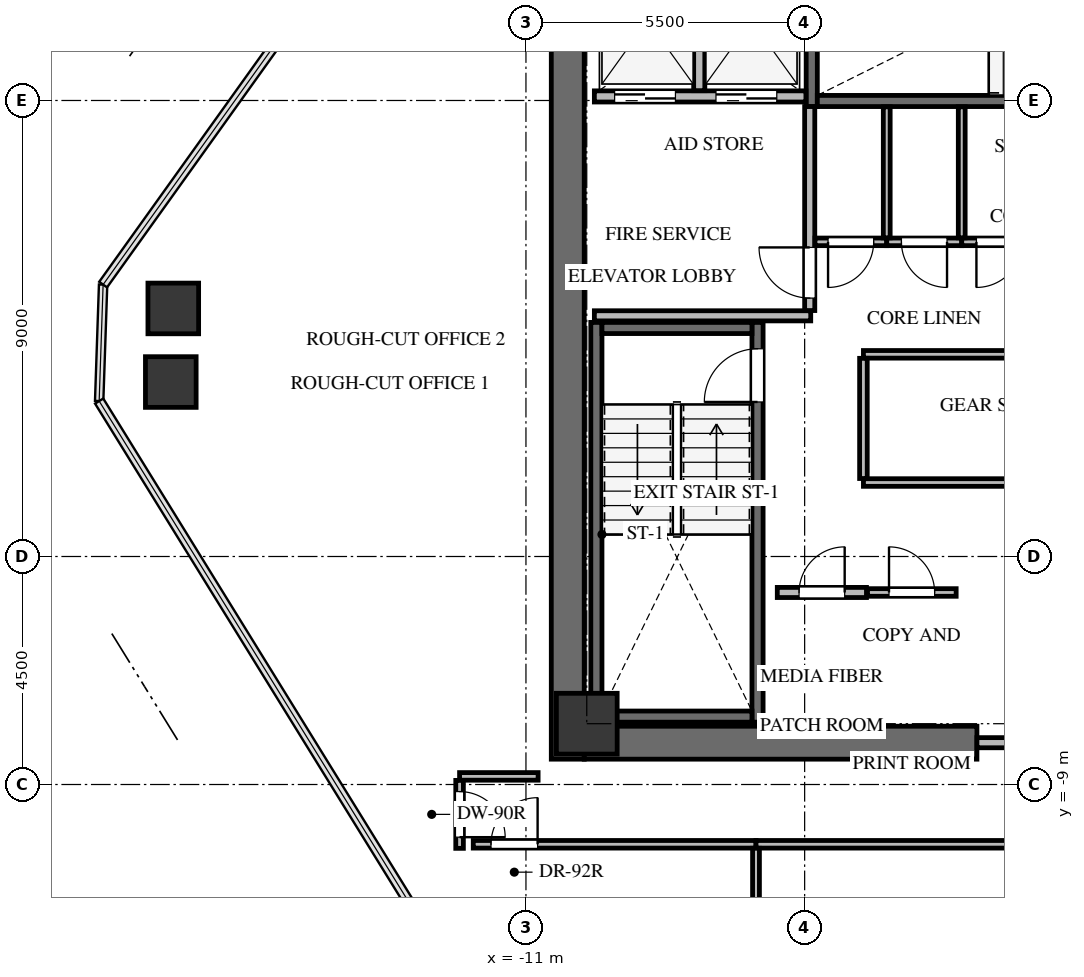
"""IFC4 building model, lengths in metres.
Left out: names, types, materials, properties, quantities, classifications, styles, units other than length and angle.
Written with IfcOpenShell. Run it as: python <this file> out.ifc"""

import sys

from ifc_helpers import new_model, si_unit, direction, frame, frame_2d, origin, origin_2d, place, context, subcontext, project, spatial, rectangle, extrude, source, transform, mapped, element, fill, save


model = new_model("IFC4")
c1 = context("Model", 3, precision=1e-05, world=origin(), true_north=direction((0.0, 1.0)))
c2 = subcontext(c1, "Body", "Model", "MODEL_VIEW")
j1 = project(units=[si_unit("LENGTHUNIT", "METRE"), si_unit("PLANEANGLEUNIT", "RADIAN")], contexts=[c1])
p1 = place(None, origin())
s1 = spatial("IfcSite", under=j1, at=p1, CompositionType="ELEMENT")
p2 = place(p1, origin())
s2 = spatial("IfcBuilding", under=s1, at=p2, CompositionType="ELEMENT")
p3 = place(p2, frame((0.0, 0.0, 180.4)))
s3 = spatial("IfcBuildingStorey", under=s2, at=p3, CompositionType="ELEMENT", Elevation=180.4)
p4 = place(p3, frame((-10.175, -8.5, 0.0), z_axis=(0.0, 0.0, 1.0), x_axis=(0.0, 1.0, 0.0)))
e1 = element("IfcWall", 1, at=p4, inside=s3, PredefinedType="SHEAR", context=c2, shape_type="SweptSolid", body=[
    extrude(rectangle(XDim=17.0, YDim=0.65, at=frame_2d((8.5, 0.0))), origin(), (0.0, 0.0, 1.0), 3.3),
])
p5 = place(p3, frame((-9.85, -8.175, 0.0), z_axis=(0.0, 0.0, 1.0), x_axis=(1.0, 0.0, 0.0)))
e2 = element("IfcWall", 2, at=p5, inside=s3, PredefinedType="SHEAR", context=c2, shape_type="SweptSolid", body=[
    extrude(rectangle(XDim=7.75, YDim=0.65, at=frame_2d((3.875, 0.0))), origin(), (0.0, 0.0, 1.0), 3.3),
])
p6 = place(p3, frame((-6.43, -7.77, -0.24), z_axis=(0.0, 0.0, 1.0), x_axis=(0.0, 1.0, 0.0)))
e3 = element("IfcWall", 3, at=p6, inside=s3, PredefinedType="SHEAR", context=c2, shape_type="SweptSolid", body=[
    extrude(rectangle(XDim=7.89, YDim=0.22, at=frame_2d((3.945, 0.0))), origin(), (0.0, 0.0, 1.0), 3.3),
])
p7 = place(p6, frame((6.32, 0.0, 0.0)))
e4 = element("IfcOpeningElement", 4, at=p7, cuts=e3, PredefinedType="OPENING", context=c2, shape_type="SweptSolid", body=[
    extrude(rectangle(XDim=1.05, YDim=2.15, at=frame_2d((0.525, 1.075))), frame((0.0, 0.12, 0.0), z_axis=(0.0, -1.0, 0.0), x_axis=(1.0, 0.0, 0.0)), (0.0, 0.0, 1.0), 0.24),
])
p8 = place(p3, frame((-9.61, 0.12, -0.24), z_axis=(0.0, 0.0, 1.0), x_axis=(0.0, -1.0, 0.0)))
e5 = element("IfcWall", 5, at=p8, inside=s3, PredefinedType="SHEAR", context=c2, shape_type="SweptSolid", body=[
    extrude(rectangle(XDim=7.89, YDim=0.22, at=frame_2d((3.945, 0.0))), origin(), (0.0, 0.0, 1.0), 3.3),
])
for number, where, z_axis, x_axis in (
    (6, (-9.5, -7.66, -0.24), (0.0, 0.0, 1.0), (1.0, 0.0, 0.0)),
    (7, (-6.54, 0.01, -0.24), (0.0, 0.0, 1.0), (-1.0, 0.0, 0.0)),
):
    element("IfcWall", number, at=place(p3, frame(where, z_axis=z_axis, x_axis=x_axis)), inside=s3, PredefinedType="SHEAR", context=c2, shape_type="SweptSolid", body=[
        extrude(rectangle(XDim=2.96, YDim=0.22, at=frame_2d((1.48, 0.0))), origin(), (0.0, 0.0, 1.0), 3.3),
    ])
p9 = place(p3, frame((-5.36, 7.78, -0.24), z_axis=(0.0, 0.0, 1.0), x_axis=(0.0, -1.0, 0.0)))
e8 = element("IfcWall", 8, at=p9, inside=s3, PredefinedType="SHEAR", context=c2, shape_type="SweptSolid", body=[
    extrude(rectangle(XDim=3.4, YDim=0.22, at=frame_2d((1.7, 0.0))), origin(), (0.0, 0.0, 1.0), 3.3),
])
p10 = place(p3, frame((-5.25, 4.49, -0.24), z_axis=(0.0, 0.0, 1.0), x_axis=(1.0, 0.0, 0.0)))
e9 = element("IfcWall", 9, at=p10, inside=s3, PredefinedType="SHEAR", context=c2, shape_type="SweptSolid", body=[
    extrude(rectangle(XDim=7.35, YDim=0.22, at=frame_2d((3.675, 0.0))), origin(), (0.0, 0.0, 1.0), 3.3),
])
p11 = place(p10, frame((5.85, 0.0, 0.0)))
e10 = element("IfcOpeningElement", 10, at=p11, cuts=e9, PredefinedType="OPENING", context=c2, shape_type="SweptSolid", body=[
    extrude(rectangle(XDim=1.05, YDim=2.15, at=frame_2d((0.525, 1.075))), frame((0.0, 0.12, 0.0), z_axis=(0.0, -1.0, 0.0), x_axis=(1.0, 0.0, 0.0)), (0.0, 0.0, 1.0), 0.24),
])
m1 = source(origin(), c2, "Body", "SweptSolid", [
    extrude(rectangle(XDim=1.2, YDim=1.2, at=origin_2d()), origin(), (0.0, 0.0, 1.0), 3.3),
])
p12 = place(p3, frame((-9.8, -7.8, -0.24), z_axis=(0.0, 0.0, 1.0), x_axis=(1.0, 0.0, 0.0)))
e11 = element("IfcColumn", 11, at=p12, inside=s3, PredefinedType="COLUMN", context=c2, shape_type="MappedRepresentation", body=[
    mapped(m1, transform((0.0, 0.0, 0.0), x_axis=(1.0, 0.0, 0.0), y_axis=(0.0, 1.0, 0.0), z_axis=(0.0, 0.0, 1.0), scale=1.0)),
])
m2 = source(origin(), c2, "Body", "SweptSolid", [
    extrude(rectangle(XDim=1.0, YDim=1.0, at=origin_2d()), origin(), (0.0, 0.0, 1.0), 3.3),
])
for number, where, z_axis, x_axis in (
    (12, (-18.009, -1.057, -0.24), (0.0, 0.0, 1.0), (1.0, 0.0, 0.0)),
    (13, (-17.96, 0.396, -0.24), (0.0, 0.0, 1.0), (1.0, 0.0, 0.0)),
):
    element("IfcColumn", number, at=place(p3, frame(where, z_axis=z_axis, x_axis=x_axis)), inside=s3, PredefinedType="COLUMN", context=c2, shape_type="MappedRepresentation", body=[
        mapped(m2, transform((0.0, 0.0, 0.0), x_axis=(1.0, 0.0, 0.0), y_axis=(0.0, 1.0, 0.0), z_axis=(0.0, 0.0, 1.0), scale=1.0)),
    ])
p13 = place(p3, frame((-2.1, -8.175, 0.0), z_axis=(0.0, 0.0, 1.0), x_axis=(1.0, 0.0, 0.0)))
e14 = element("IfcWall", 14, at=p13, inside=s3, PredefinedType="SOLIDWALL", context=c2, shape_type="SweptSolid", body=[
    extrude(rectangle(XDim=4.2, YDim=0.2, at=frame_2d((2.1, 0.0))), origin(), (0.0, 0.0, 1.0), 3.045),
])
p14 = place(p13, frame((1.2, 0.0, 0.0)))
e15 = element("IfcOpeningElement", 15, at=p14, cuts=e14, PredefinedType="OPENING", context=c2, shape_type="SweptSolid", body=[
    extrude(rectangle(XDim=1.8, YDim=2.15, at=frame_2d((0.9, 1.075))), frame((0.0, 0.11, 0.0), z_axis=(0.0, -1.0, 0.0), x_axis=(1.0, 0.0, 0.0)), (0.0, 0.0, 1.0), 0.22),
])
p15 = place(p3, frame((-9.65, 4.58, 0.0), z_axis=(0.0, 0.0, 1.0), x_axis=(1.0, 0.0, 0.0)))
e16 = element("IfcWall", 16, at=p15, inside=s3, PredefinedType="SOLIDWALL", context=c2, shape_type="SweptSolid", body=[
    extrude(rectangle(XDim=4.175, YDim=0.22, at=frame_2d((2.087, 0.0))), origin(), (0.0, 0.0, 1.0), 3.045),
])
p16 = place(p15, frame((0.4, 0.0, 0.0)))
e17 = element("IfcOpeningElement", 17, at=p16, cuts=e16, PredefinedType="OPENING", context=c2, shape_type="SweptSolid", body=[
    extrude(rectangle(XDim=1.2, YDim=2.15, at=frame_2d((0.6, 1.075))), frame((0.0, 0.12, 0.0), z_axis=(0.0, -1.0, 0.0), x_axis=(1.0, 0.0, 0.0)), (0.0, 0.0, 1.0), 0.24),
])
p17 = place(p15, frame((2.4, 0.0, 0.0)))
e18 = element("IfcOpeningElement", 18, at=p17, cuts=e16, PredefinedType="OPENING", context=c2, shape_type="SweptSolid", body=[
    extrude(rectangle(XDim=1.2, YDim=2.15, at=frame_2d((0.6, 1.075))), frame((0.0, 0.12, 0.0), z_axis=(0.0, -1.0, 0.0), x_axis=(1.0, 0.0, 0.0)), (0.0, 0.0, 1.0), 0.24),
])
p18 = place(p3, frame((-7.58, 4.694, 0.0), z_axis=(0.0, 0.0, 1.0), x_axis=(0.0, 1.0, 0.0)))
e19 = element("IfcWall", 19, at=p18, inside=s3, PredefinedType="SOLIDWALL", context=c2, shape_type="SweptSolid", body=[
    extrude(rectangle(XDim=2.906, YDim=0.22, at=frame_2d((1.453, 0.0))), origin(), (0.0, 0.0, 1.0), 3.045),
])
p19 = place(p3, frame((-9.65, 0.25, 0.0), z_axis=(0.0, 0.0, 1.0), x_axis=(1.0, 0.0, 0.0)))
e20 = element("IfcWall", 20, at=p19, inside=s3, PredefinedType="SOLIDWALL", context=c2, shape_type="SweptSolid", body=[
    extrude(rectangle(XDim=4.27, YDim=0.2, at=frame_2d((2.135, 0.0))), origin(), (0.0, 0.0, 1.0), 3.045),
])
p20 = place(p3, frame((-5.4, 0.354, 0.0), z_axis=(0.0, 0.0, 1.0), x_axis=(0.0, 1.0, 0.0)))
e21 = element("IfcWall", 21, at=p20, inside=s3, PredefinedType="SOLIDWALL", context=c2, shape_type="SweptSolid", body=[
    extrude(rectangle(XDim=4.026, YDim=0.2, at=frame_2d((2.013, 0.0))), origin(), (0.0, 0.0, 1.0), 3.045),
])
p21 = place(p20, frame((0.246, 0.0, 0.0)))
e22 = element("IfcOpeningElement", 22, at=p21, cuts=e21, PredefinedType="OPENING", context=c2, shape_type="SweptSolid", body=[
    extrude(rectangle(XDim=1.0, YDim=2.15, at=frame_2d((0.5, 1.075))), frame((0.0, 0.11, 0.0), z_axis=(0.0, -1.0, 0.0), x_axis=(1.0, 0.0, 0.0)), (0.0, 0.0, 1.0), 0.22),
])
p22 = place(p3, frame((-6.04, -5.21, 0.0), z_axis=(0.0, 0.0, 1.0), x_axis=(1.0, 0.0, 0.0)))
e23 = element("IfcWall", 23, at=p22, inside=s3, PredefinedType="SOLIDWALL", context=c2, shape_type="SweptSolid", body=[
    extrude(rectangle(XDim=1.76, YDim=0.2, at=frame_2d((0.88, 0.0))), origin(), (0.0, 0.0, 1.0), 3.045),
])
p23 = place(p22, frame((0.43, 0.0, 0.0)))
e24 = element("IfcOpeningElement", 24, at=p23, cuts=e23, PredefinedType="OPENING", context=c2, shape_type="SweptSolid", body=[
    extrude(rectangle(XDim=0.9, YDim=2.05, at=frame_2d((0.45, 1.025))), frame((0.0, 0.11, 0.0), z_axis=(0.0, -1.0, 0.0), x_axis=(1.0, 0.0, 0.0)), (0.0, 0.0, 1.0), 0.22),
])
p24 = place(p3, frame((-4.26, -5.21, 0.0), z_axis=(0.0, 0.0, 1.0), x_axis=(1.0, 0.0, 0.0)))
e25 = element("IfcWall", 25, at=p24, inside=s3, PredefinedType="PARTITIONING", context=c2, shape_type="SweptSolid", body=[
    extrude(rectangle(XDim=1.75, YDim=0.15, at=frame_2d((0.875, 0.0))), origin(), (0.0, 0.0, 1.0), 3.045),
])
p25 = place(p24, frame((0.425, 0.0, 0.0)))
e26 = element("IfcOpeningElement", 26, at=p25, cuts=e25, PredefinedType="OPENING", context=c2, shape_type="SweptSolid", body=[
    extrude(rectangle(XDim=0.9, YDim=2.05, at=frame_2d((0.45, 1.025))), frame((0.0, 0.085, 0.0), z_axis=(0.0, -1.0, 0.0), x_axis=(1.0, 0.0, 0.0)), (0.0, 0.0, 1.0), 0.17),
])
p26 = place(p3, frame((3.14, -3.04, 0.0), z_axis=(0.0, 0.0, 1.0), x_axis=(-1.0, 0.0, 0.0)))
e27 = element("IfcWall", 27, at=p26, inside=s3, PredefinedType="PARTITIONING", context=c2, shape_type="SweptSolid", body=[
    extrude(rectangle(XDim=7.48, YDim=0.15, at=frame_2d((3.74, 0.0))), origin(), (0.0, 0.0, 1.0), 3.045),
])
p27 = place(p26, frame((3.29, 0.0, 0.0)))
e28 = element("IfcOpeningElement", 28, at=p27, cuts=e27, PredefinedType="OPENING", context=c2, shape_type="SweptSolid", body=[
    extrude(rectangle(XDim=0.9, YDim=2.05, at=frame_2d((0.45, 1.025))), frame((0.0, 0.085, 0.0), z_axis=(0.0, -1.0, 0.0), x_axis=(1.0, 0.0, 0.0)), (0.0, 0.0, 1.0), 0.17),
])
p28 = place(p3, frame((-4.34, -0.51, 0.0), z_axis=(0.0, 0.0, 1.0), x_axis=(1.0, 0.0, 0.0)))
e29 = element("IfcWall", 29, at=p28, inside=s3, PredefinedType="PARTITIONING", context=c2, shape_type="SweptSolid", body=[
    extrude(rectangle(XDim=7.48, YDim=0.15, at=frame_2d((3.74, 0.0))), origin(), (0.0, 0.0, 1.0), 3.045),
])
p29 = place(p3, frame((-4.34, -2.961, 0.0), z_axis=(0.0, 0.0, 1.0), x_axis=(0.0, 1.0, 0.0)))
e30 = element("IfcWall", 30, at=p29, inside=s3, PredefinedType="PARTITIONING", context=c2, shape_type="SweptSolid", body=[
    extrude(rectangle(XDim=2.372, YDim=0.15, at=frame_2d((1.186, 0.0))), origin(), (0.0, 0.0, 1.0), 3.045),
])
p30 = place(p3, frame((-3.88, 1.71, 0.0), z_axis=(0.0, 0.0, 1.0), x_axis=(-1.0, 0.0, 0.0)))
e31 = element("IfcWall", 31, at=p30, inside=s3, PredefinedType="PARTITIONING", context=c2, shape_type="SweptSolid", body=[
    extrude(rectangle(XDim=1.416, YDim=0.15, at=frame_2d((0.708, 0.0))), origin(), (0.0, 0.0, 1.0), 3.045),
])
p31 = place(p30, frame((0.258, 0.0, 0.0)))
e32 = element("IfcOpeningElement", 32, at=p31, cuts=e31, PredefinedType="OPENING", context=c2, shape_type="SweptSolid", body=[
    extrude(rectangle(XDim=0.9, YDim=2.05, at=frame_2d((0.45, 1.025))), frame((0.0, 0.085, 0.0), z_axis=(0.0, -1.0, 0.0), x_axis=(1.0, 0.0, 0.0)), (0.0, 0.0, 1.0), 0.17),
])
p32 = place(p3, frame((-2.4, 1.71, 0.0), z_axis=(0.0, 0.0, 1.0), x_axis=(-1.0, 0.0, 0.0)))
e33 = element("IfcWall", 33, at=p32, inside=s3, PredefinedType="PARTITIONING", context=c2, shape_type="SweptSolid", body=[
    extrude(rectangle(XDim=1.48, YDim=0.15, at=frame_2d((0.74, 0.0))), origin(), (0.0, 0.0, 1.0), 3.045),
])
p33 = place(p32, frame((0.29, 0.0, 0.0)))
e34 = element("IfcOpeningElement", 34, at=p33, cuts=e33, PredefinedType="OPENING", context=c2, shape_type="SweptSolid", body=[
    extrude(rectangle(XDim=0.9, YDim=2.05, at=frame_2d((0.45, 1.025))), frame((0.0, 0.085, 0.0), z_axis=(0.0, -1.0, 0.0), x_axis=(1.0, 0.0, 0.0)), (0.0, 0.0, 1.0), 0.17),
])
p34 = place(p3, frame((-0.92, 1.71, 0.0), z_axis=(0.0, 0.0, 1.0), x_axis=(-1.0, 0.0, 0.0)))
e35 = element("IfcWall", 35, at=p34, inside=s3, PredefinedType="PARTITIONING", context=c2, shape_type="SweptSolid", body=[
    extrude(rectangle(XDim=1.48, YDim=0.15, at=frame_2d((0.74, 0.0))), origin(), (0.0, 0.0, 1.0), 3.045),
])
p35 = place(p34, frame((0.29, 0.0, 0.0)))
e36 = element("IfcOpeningElement", 36, at=p35, cuts=e35, PredefinedType="OPENING", context=c2, shape_type="SweptSolid", body=[
    extrude(rectangle(XDim=0.9, YDim=2.05, at=frame_2d((0.45, 1.025))), frame((0.0, 0.085, 0.0), z_axis=(0.0, -1.0, 0.0), x_axis=(1.0, 0.0, 0.0)), (0.0, 0.0, 1.0), 0.17),
])
p36 = place(p3, frame((-12.04, -10.18, 0.0), z_axis=(0.0, 0.0, 1.0), x_axis=(1.0, 0.0, 0.0)))
e37 = element("IfcWall", 37, at=p36, inside=s3, PredefinedType="PARTITIONING", context=c2, shape_type="SweptSolid", body=[
    extrude(rectangle(XDim=5.58, YDim=0.15, at=frame_2d((2.79, 0.0))), origin(), (0.0, 0.0, 1.0), 3.045),
])
p37 = place(p36, frame((0.35, 0.0, 0.0)))
e38 = element("IfcOpeningElement", 38, at=p37, cuts=e37, PredefinedType="OPENING", context=c2, shape_type="SweptSolid", body=[
    extrude(rectangle(XDim=0.92, YDim=2.1, at=frame_2d((0.46, 1.05))), frame((0.0, 0.085, 0.0), z_axis=(0.0, -1.0, 0.0), x_axis=(1.0, 0.0, 0.0)), (0.0, 0.0, 1.0), 0.17),
])
p38 = place(p3, frame((-6.46, -10.18, 0.0), z_axis=(0.0, 0.0, 1.0), x_axis=(1.0, 0.0, 0.0)))
e39 = element("IfcWall", 39, at=p38, inside=s3, PredefinedType="PARTITIONING", context=c2, shape_type="SweptSolid", body=[
    extrude(rectangle(XDim=5.371, YDim=0.15, at=frame_2d((2.686, 0.0))), origin(), (0.0, 0.0, 1.0), 2.242),
])
p39 = place(p3, frame((-10.76, -8.84, 0.0), z_axis=(0.0, 0.0, 1.0), x_axis=(-1.0, 0.0, 0.0)))
e40 = element("IfcWall", 40, at=p39, inside=s3, PredefinedType="PARTITIONING", context=c2, shape_type="SweptSolid", body=[
    extrude(rectangle(XDim=1.55, YDim=0.15, at=frame_2d((0.775, 0.0))), origin(), (0.0, 0.0, 1.0), 3.045),
])
p40 = place(p3, frame((-12.31, -8.919, 0.0), z_axis=(0.0, 0.0, 1.0), x_axis=(0.0, -1.0, 0.0)))
e41 = element("IfcWall", 41, at=p40, inside=s3, PredefinedType="PARTITIONING", context=c2, shape_type="SweptSolid", body=[
    extrude(rectangle(XDim=1.341, YDim=0.15, at=frame_2d((0.67, 0.0))), origin(), (0.0, 0.0, 1.0), 2.399),
])
p41 = place(p40, frame((0.22, 0.0, 0.0)))
e42 = element("IfcOpeningElement", 42, at=p41, cuts=e41, PredefinedType="OPENING", context=c2, shape_type="SweptSolid", body=[
    extrude(rectangle(XDim=0.9, YDim=2.05, at=frame_2d((0.45, 1.025))), frame((0.0, 0.085, 0.0), z_axis=(0.0, -1.0, 0.0), x_axis=(1.0, 0.0, 0.0)), (0.0, 0.0, 1.0), 0.17),
])
for number, where, z_axis, x_axis in (
    (43, (-3.88, 4.375, 0.0), (0.0, 0.0, 1.0), (0.0, -1.0, 0.0)),
    (44, (-2.4, 4.375, 0.0), (0.0, 0.0, 1.0), (0.0, -1.0, 0.0)),
):
    element("IfcWall", number, at=place(p3, frame(where, z_axis=z_axis, x_axis=x_axis)), inside=s3, PredefinedType="PARTITIONING", context=c2, shape_type="SweptSolid", body=[
        extrude(rectangle(XDim=2.586, YDim=0.135, at=frame_2d((1.293, 0.0))), origin(), (0.0, 0.0, 1.0), 3.045),
    ])
p42 = place(p3, frame((-6.46, -10.259, 0.0), z_axis=(0.0, 0.0, 1.0), x_axis=(0.0, -1.0, 0.0)))
e45 = element("IfcWall", 45, at=p42, inside=s3, PredefinedType="PARTITIONING", context=c2, shape_type="SweptSolid", body=[
    extrude(rectangle(XDim=7.683, YDim=0.135, at=frame_2d((3.841, 0.0))), origin(), (0.0, 0.0, 1.0), 2.242),
])
m3 = source(origin(), c2, "Body", "SweptSolid", [
    extrude(rectangle(XDim=1.05, YDim=2.15, at=frame_2d((0.525, 1.075))), frame((0.0, 0.025, 0.0), z_axis=(0.0, -1.0, 0.0), x_axis=(1.0, 0.0, 0.0)), (0.0, 0.0, 1.0), 0.05),
])
p43 = place(p7, origin())
e46 = element("IfcDoor", 46, at=p43, inside=s3, OperationType="SINGLE_SWING_LEFT", PredefinedType="DOOR", context=c2, shape_type="MappedRepresentation", body=[
    mapped(m3, transform((0.0, 0.0, 0.0), x_axis=(1.0, 0.0, 0.0), y_axis=(0.0, 1.0, 0.0), z_axis=(0.0, 0.0, 1.0), scale=1.0)),
])
fill(e4, e46)
m4 = source(origin(), c2, "Body", "SweptSolid", [
    extrude(rectangle(XDim=1.2, YDim=2.15, at=frame_2d((0.6, 1.075))), frame((0.0, 0.025, 0.0), z_axis=(0.0, -1.0, 0.0), x_axis=(1.0, 0.0, 0.0)), (0.0, 0.0, 1.0), 0.05),
])
p44 = place(p16, origin())
e47 = element("IfcDoor", 47, at=p44, inside=s3, OperationType="DOUBLE_DOOR_SLIDING", PredefinedType="DOOR", context=c2, shape_type="MappedRepresentation", body=[
    mapped(m4, transform((0.0, 0.0, 0.0), x_axis=(1.0, 0.0, 0.0), y_axis=(0.0, 1.0, 0.0), z_axis=(0.0, 0.0, 1.0), scale=1.0)),
])
fill(e17, e47)
p45 = place(p17, origin())
e48 = element("IfcDoor", 48, at=p45, inside=s3, OperationType="DOUBLE_DOOR_SLIDING", PredefinedType="DOOR", context=c2, shape_type="MappedRepresentation", body=[
    mapped(m4, transform((0.0, 0.0, 0.0), x_axis=(1.0, 0.0, 0.0), y_axis=(0.0, 1.0, 0.0), z_axis=(0.0, 0.0, 1.0), scale=1.0)),
])
fill(e18, e48)
m5 = source(origin(), c2, "Body", "SweptSolid", [
    extrude(rectangle(XDim=1.0, YDim=2.15, at=frame_2d((0.5, 1.075))), frame((0.0, 0.025, 0.0), z_axis=(0.0, -1.0, 0.0), x_axis=(1.0, 0.0, 0.0)), (0.0, 0.0, 1.0), 0.05),
])
p46 = place(p21, origin())
e49 = element("IfcDoor", 49, at=p46, inside=s3, OperationType="SINGLE_SWING_RIGHT", PredefinedType="DOOR", context=c2, shape_type="MappedRepresentation", body=[
    mapped(m5, transform((0.0, 0.0, 0.0), x_axis=(1.0, 0.0, 0.0), y_axis=(0.0, 1.0, 0.0), z_axis=(0.0, 0.0, 1.0), scale=1.0)),
])
fill(e22, e49)
m6 = source(origin(), c2, "Body", "SweptSolid", [
    extrude(rectangle(XDim=0.9, YDim=2.05, at=frame_2d((0.45, 1.025))), frame((0.0, 0.025, 0.0), z_axis=(0.0, -1.0, 0.0), x_axis=(1.0, 0.0, 0.0)), (0.0, 0.0, 1.0), 0.05),
])
p47 = place(p23, origin())
e50 = element("IfcDoor", 50, at=p47, inside=s3, OperationType="SINGLE_SWING_RIGHT", PredefinedType="DOOR", context=c2, shape_type="MappedRepresentation", body=[
    mapped(m6, transform((0.0, 0.0, 0.0), x_axis=(1.0, 0.0, 0.0), y_axis=(0.0, 1.0, 0.0), z_axis=(0.0, 0.0, 1.0), scale=1.0)),
])
fill(e24, e50)
m7 = source(origin(), c2, "Body", "SweptSolid", [
    extrude(rectangle(XDim=0.9, YDim=2.05, at=frame_2d((0.45, 1.025))), frame((0.0, 0.025, 0.0), z_axis=(0.0, -1.0, 0.0), x_axis=(1.0, 0.0, 0.0)), (0.0, 0.0, 1.0), 0.05),
])
p48 = place(p25, origin())
e51 = element("IfcDoor", 51, at=p48, inside=s3, OperationType="SINGLE_SWING_LEFT", PredefinedType="DOOR", context=c2, shape_type="MappedRepresentation", body=[
    mapped(m7, transform((0.0, 0.0, 0.0), x_axis=(1.0, 0.0, 0.0), y_axis=(0.0, 1.0, 0.0), z_axis=(0.0, 0.0, 1.0), scale=1.0)),
])
fill(e26, e51)
p49 = place(p31, origin())
e52 = element("IfcDoor", 52, at=p49, inside=s3, OperationType="SINGLE_SWING_RIGHT", PredefinedType="DOOR", context=c2, shape_type="MappedRepresentation", body=[
    mapped(m6, transform((0.0, 0.0, 0.0), x_axis=(1.0, 0.0, 0.0), y_axis=(0.0, 1.0, 0.0), z_axis=(0.0, 0.0, 1.0), scale=1.0)),
])
fill(e32, e52)
p50 = place(p33, origin())
e53 = element("IfcDoor", 53, at=p50, inside=s3, OperationType="SINGLE_SWING_LEFT", PredefinedType="DOOR", context=c2, shape_type="MappedRepresentation", body=[
    mapped(m7, transform((0.0, 0.0, 0.0), x_axis=(1.0, 0.0, 0.0), y_axis=(0.0, 1.0, 0.0), z_axis=(0.0, 0.0, 1.0), scale=1.0)),
])
fill(e34, e53)
p51 = place(p35, origin())
e54 = element("IfcDoor", 54, at=p51, inside=s3, OperationType="SINGLE_SWING_RIGHT", PredefinedType="DOOR", context=c2, shape_type="MappedRepresentation", body=[
    mapped(m6, transform((0.0, 0.0, 0.0), x_axis=(1.0, 0.0, 0.0), y_axis=(0.0, 1.0, 0.0), z_axis=(0.0, 0.0, 1.0), scale=1.0)),
])
fill(e36, e54)
m8 = source(origin(), c2, "Body", "SweptSolid", [
    extrude(rectangle(XDim=0.92, YDim=2.1, at=frame_2d((0.46, 1.05))), frame((0.0, 0.025, 0.0), z_axis=(0.0, -1.0, 0.0), x_axis=(1.0, 0.0, 0.0)), (0.0, 0.0, 1.0), 0.05),
])
p52 = place(p37, origin())
e55 = element("IfcDoor", 55, at=p52, inside=s3, OperationType="SINGLE_SWING_RIGHT", PredefinedType="DOOR", context=c2, shape_type="MappedRepresentation", body=[
    mapped(m8, transform((0.0, 0.0, 0.0), x_axis=(1.0, 0.0, 0.0), y_axis=(0.0, 1.0, 0.0), z_axis=(0.0, 0.0, 1.0), scale=1.0)),
])
fill(e38, e55)
m9 = source(origin(), c2, "Body", "SweptSolid", [
    extrude(rectangle(XDim=0.9, YDim=2.05, at=frame_2d((0.45, 1.025))), frame((0.0, 0.025, 0.0), z_axis=(0.0, -1.0, 0.0), x_axis=(1.0, 0.0, 0.0)), (0.0, 0.0, 1.0), 0.05),
])
p53 = place(p41, origin())
e56 = element("IfcDoor", 56, at=p53, inside=s3, OperationType="SINGLE_SWING_RIGHT", PredefinedType="DOOR", context=c2, shape_type="MappedRepresentation", body=[
    mapped(m9, transform((0.0, 0.0, 0.0), x_axis=(1.0, 0.0, 0.0), y_axis=(0.0, 1.0, 0.0), z_axis=(0.0, 0.0, 1.0), scale=1.0)),
])
fill(e42, e56)
save(model, sys.argv[1])
